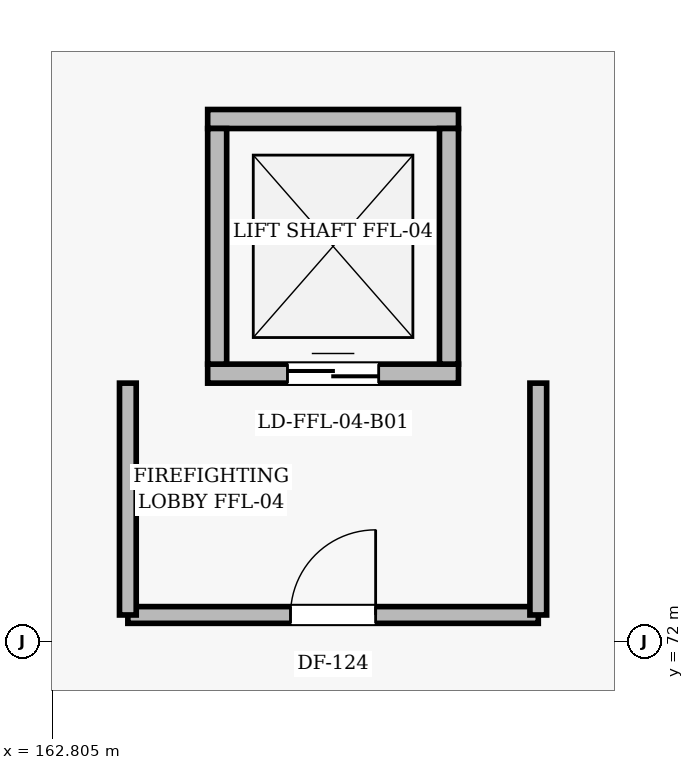
"""IFC4 building model, lengths in metres.
Left out: names, types, materials, properties, quantities, classifications, styles, units other than length and angle.
Written with IfcOpenShell. Run it as: python <this file> out.ifc"""

import sys

from ifc_helpers import new_model, si_unit, direction, frame, frame_2d, origin, place, context, subcontext, project, spatial, rectangle, extrude, element, fill, save


model = new_model("IFC4")
c1 = context("Model", 3, precision=1e-05, world=origin(), true_north=direction((0.0, 1.0)))
c2 = subcontext(c1, "Body", "Model", "MODEL_VIEW")
j1 = project(units=[si_unit("LENGTHUNIT", "METRE"), si_unit("PLANEANGLEUNIT", "RADIAN")], contexts=[c1])
p1 = place(None, origin())
s1 = spatial("IfcSite", under=j1, at=p1, CompositionType="ELEMENT")
p2 = place(p1, origin())
s2 = spatial("IfcBuilding", under=s1, at=p2, CompositionType="ELEMENT")
p3 = place(p2, frame((0.0, 0.0, -5.4)))
s3 = spatial("IfcBuildingStorey", under=s2, at=p3, CompositionType="ELEMENT", Elevation=-5.4)
p4 = place(p3, frame((164.85, 75.525, 0.0), z_axis=(0.0, 0.0, 1.0), x_axis=(1.0, 0.0, 0.0)))
e1 = element("IfcWall", 1, at=p4, inside=s3, PredefinedType="SOLIDWALL", context=c2, shape_type="SweptSolid", body=[
    extrude(rectangle(XDim=3.3, YDim=0.25, at=frame_2d((1.65, 0.0))), origin(), (0.0, 0.0, 1.0), 5.1),
])
p5 = place(p4, frame((1.05, 0.0, 0.0)))
e2 = element("IfcOpeningElement", 2, at=p5, cuts=e1, PredefinedType="OPENING", context=c2, shape_type="SweptSolid", body=[
    extrude(rectangle(XDim=1.2, YDim=2.25, at=frame_2d((0.6, 1.125))), frame((0.0, 0.135, 0.0), z_axis=(0.0, -1.0, 0.0), x_axis=(1.0, 0.0, 0.0)), (0.0, 0.0, 1.0), 0.27),
])
p6 = place(p3, frame((168.15, 78.875, 0.0), z_axis=(0.0, 0.0, 1.0), x_axis=(-1.0, 0.0, 0.0)))
e3 = element("IfcWall", 3, at=p6, inside=s3, PredefinedType="SOLIDWALL", context=c2, shape_type="SweptSolid", body=[
    extrude(rectangle(XDim=3.3, YDim=0.25, at=frame_2d((1.65, 0.0))), origin(), (0.0, 0.0, 1.0), 5.1),
])
for number, where, z_axis, x_axis in (
    (4, (164.975, 78.75, 0.0), (0.0, 0.0, 1.0), (0.0, -1.0, 0.0)),
    (5, (168.025, 75.65, 0.0), (0.0, 0.0, 1.0), (0.0, 1.0, 0.0)),
):
    element("IfcWall", number, at=place(p3, frame(where, z_axis=z_axis, x_axis=x_axis)), inside=s3, PredefinedType="SOLIDWALL", context=c2, shape_type="SweptSolid", body=[
        extrude(rectangle(XDim=3.1, YDim=0.25, at=frame_2d((1.55, 0.0))), origin(), (0.0, 0.0, 1.0), 5.1),
    ])
p7 = place(p3, frame((163.8, 72.35, 0.0), z_axis=(0.0, 0.0, 1.0), x_axis=(1.0, 0.0, 0.0)))
e6 = element("IfcWall", 6, at=p7, inside=s3, PredefinedType="SOLIDWALL", context=c2, shape_type="SweptSolid", body=[
    extrude(rectangle(XDim=5.4, YDim=0.22, at=frame_2d((2.7, 0.0))), origin(), (0.0, 0.0, 1.0), 4.352),
])
p8 = place(p7, frame((2.14, 0.0, 0.0)))
e7 = element("IfcOpeningElement", 7, at=p8, cuts=e6, PredefinedType="OPENING", context=c2, shape_type="SweptSolid", body=[
    extrude(rectangle(XDim=1.12, YDim=2.2, at=frame_2d((0.56, 1.1))), frame((0.0, 0.12, 0.0), z_axis=(0.0, -1.0, 0.0), x_axis=(1.0, 0.0, 0.0)), (0.0, 0.0, 1.0), 0.24),
])
for number, where, z_axis, x_axis in (
    (8, (163.8, 72.35, 0.0), (0.0, 0.0, 1.0), (0.0, 1.0, 0.0)),
    (9, (169.2, 72.35, 0.0), (0.0, 0.0, 1.0), (0.0, 1.0, 0.0)),
):
    element("IfcWall", number, at=place(p3, frame(where, z_axis=z_axis, x_axis=x_axis)), inside=s3, PredefinedType="SOLIDWALL", context=c2, shape_type="SweptSolid", body=[
        extrude(rectangle(XDim=3.05, YDim=0.22, at=frame_2d((1.525, 0.0))), origin(), (0.0, 0.0, 1.0), 4.352),
    ])
p9 = place(p5, origin())
e10 = element("IfcDoor", 10, at=p9, inside=s3, OperationType="DOUBLE_DOOR_SLIDING", PredefinedType="DOOR", context=c2, shape_type="SweptSolid", body=[
    extrude(rectangle(XDim=1.2, YDim=2.25, at=frame_2d((0.6, 1.125))), frame((0.0, 0.025, 0.0), z_axis=(0.0, -1.0, 0.0), x_axis=(1.0, 0.0, 0.0)), (0.0, 0.0, 1.0), 0.05),
])
fill(e2, e10)
p10 = place(p8, origin())
e11 = element("IfcDoor", 11, at=p10, inside=s3, OperationType="SINGLE_SWING_RIGHT", PredefinedType="DOOR", context=c2, shape_type="SweptSolid", body=[
    extrude(rectangle(XDim=1.12, YDim=2.2, at=frame_2d((0.56, 1.1))), frame((0.0, 0.025, 0.0), z_axis=(0.0, -1.0, 0.0), x_axis=(1.0, 0.0, 0.0)), (0.0, 0.0, 1.0), 0.05),
])
fill(e7, e11)
save(model, sys.argv[1])
